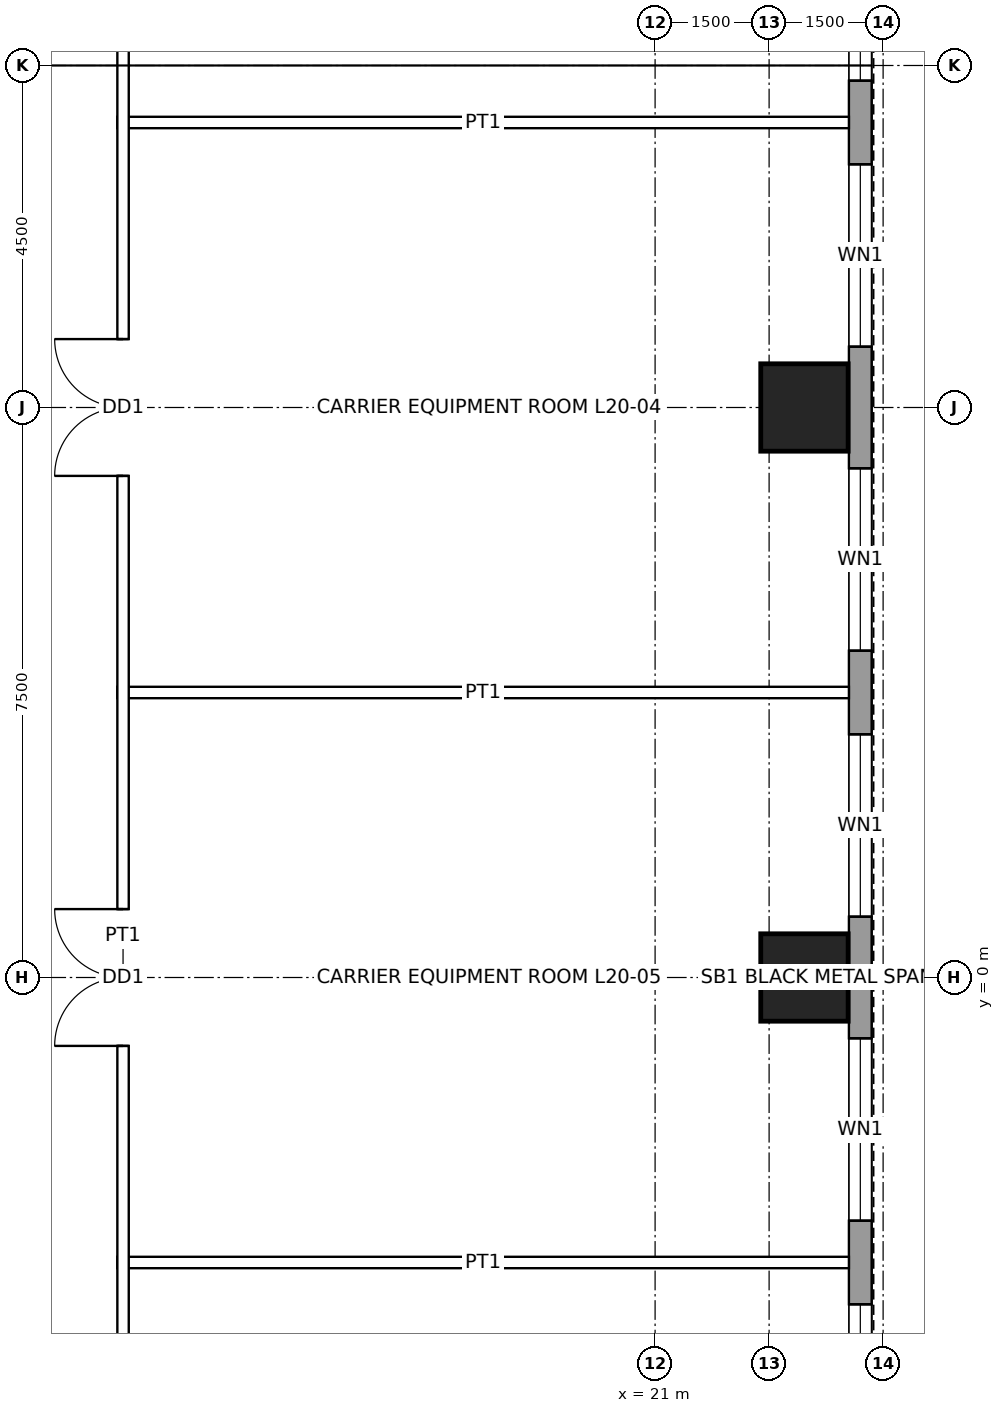
"""IFC4 building model, lengths in metres.
Left out: names, types, materials, properties, quantities, classifications, styles, units other than length and angle.
Written with IfcOpenShell. Run it as: python <this file> out.ifc"""

import sys

from ifc_helpers import new_model, si_unit, direction, frame, frame_2d, origin, origin_2d, place, context, subcontext, project, spatial, rectangle, hollow_rectangle, extrude, element, fill, save


model = new_model("IFC4")
c1 = context("Model", 3, precision=1e-05, world=origin(), true_north=direction((0.0, 1.0)))
c2 = subcontext(c1, "Body", "Model", "MODEL_VIEW")
j1 = project(units=[si_unit("LENGTHUNIT", "METRE"), si_unit("PLANEANGLEUNIT", "RADIAN")], contexts=[c1])
p1 = place(None, origin())
s1 = spatial("IfcSite", under=j1, at=p1, CompositionType="ELEMENT")
p2 = place(p1, origin())
s2 = spatial("IfcBuilding", under=s1, at=p2, CompositionType="ELEMENT")
p3 = place(p2, frame((0.0, 0.0, 104.4)))
s3 = spatial("IfcBuildingStorey", under=s2, at=p3, CompositionType="ELEMENT", Elevation=104.4)
for number, where, z_axis, x_axis in (
    (1, (22.965, 7.5, 0.0), (0.0, 0.0, 1.0), (1.0, 0.0, 0.0)),
    (2, (22.965, 0.0, 0.0), (0.0, 0.0, 1.0), (1.0, 0.0, 0.0)),
):
    element("IfcColumn", number, at=place(p3, frame(where, z_axis=z_axis, x_axis=x_axis)), inside=s3, PredefinedType="COLUMN", context=c2, shape_type="SweptSolid", body=[
        extrude(hollow_rectangle(XDim=1.15, YDim=1.15, WallThickness=0.075, at=origin_2d()), origin(), (0.0, 0.0, 1.0), 4.5),
    ])
p4 = place(p3, frame((23.7, 16.2, 0.0), z_axis=(0.0, 0.0, 1.0), x_axis=(0.0, -1.0, 0.0)))
e3 = element("IfcWall", 3, at=p4, inside=s3, PredefinedType="SOLIDWALL", context=c2, shape_type="SweptSolid", body=[
    extrude(rectangle(XDim=32.4, YDim=0.3, at=frame_2d((16.2, 0.0))), origin(), (0.0, 0.0, 1.0), 4.3),
])
p5 = place(p4, frame((2.0, 0.0, 1.0)))
e4 = element("IfcOpeningElement", 4, at=p5, cuts=e3, PredefinedType="OPENING", context=c2, shape_type="SweptSolid", body=[
    extrude(rectangle(XDim=2.4, YDim=1.2, at=frame_2d((1.2, 0.6))), frame((0.0, 0.16, 0.0), z_axis=(0.0, -1.0, 0.0), x_axis=(1.0, 0.0, 0.0)), (0.0, 0.0, 1.0), 0.32),
])
p6 = place(p4, frame((5.5, 0.0, 1.0)))
e5 = element("IfcOpeningElement", 5, at=p6, cuts=e3, PredefinedType="OPENING", context=c2, shape_type="SweptSolid", body=[
    extrude(rectangle(XDim=2.4, YDim=1.2, at=frame_2d((1.2, 0.6))), frame((0.0, 0.16, 0.0), z_axis=(0.0, -1.0, 0.0), x_axis=(1.0, 0.0, 0.0)), (0.0, 0.0, 1.0), 0.32),
])
p7 = place(p4, frame((9.5, 0.0, 1.0)))
e6 = element("IfcOpeningElement", 6, at=p7, cuts=e3, PredefinedType="OPENING", context=c2, shape_type="SweptSolid", body=[
    extrude(rectangle(XDim=2.4, YDim=1.2, at=frame_2d((1.2, 0.6))), frame((0.0, 0.16, 0.0), z_axis=(0.0, -1.0, 0.0), x_axis=(1.0, 0.0, 0.0)), (0.0, 0.0, 1.0), 0.32),
])
p8 = place(p4, frame((13.0, 0.0, 1.0)))
e7 = element("IfcOpeningElement", 7, at=p8, cuts=e3, PredefinedType="OPENING", context=c2, shape_type="SweptSolid", body=[
    extrude(rectangle(XDim=2.4, YDim=1.2, at=frame_2d((1.2, 0.6))), frame((0.0, 0.16, 0.0), z_axis=(0.0, -1.0, 0.0), x_axis=(1.0, 0.0, 0.0)), (0.0, 0.0, 1.0), 0.32),
])
p9 = place(p4, frame((17.0, 0.0, 1.0)))
e8 = element("IfcOpeningElement", 8, at=p9, cuts=e3, PredefinedType="OPENING", context=c2, shape_type="SweptSolid", body=[
    extrude(rectangle(XDim=2.4, YDim=1.2, at=frame_2d((1.2, 0.6))), frame((0.0, 0.16, 0.0), z_axis=(0.0, -1.0, 0.0), x_axis=(1.0, 0.0, 0.0)), (0.0, 0.0, 1.0), 0.32),
])
p10 = place(p4, frame((20.5, 0.0, 1.0)))
e9 = element("IfcOpeningElement", 9, at=p10, cuts=e3, PredefinedType="OPENING", context=c2, shape_type="SweptSolid", body=[
    extrude(rectangle(XDim=2.4, YDim=1.2, at=frame_2d((1.2, 0.6))), frame((0.0, 0.16, 0.0), z_axis=(0.0, -1.0, 0.0), x_axis=(1.0, 0.0, 0.0)), (0.0, 0.0, 1.0), 0.32),
])
p11 = place(p4, frame((24.5, 0.0, 1.0)))
e10 = element("IfcOpeningElement", 10, at=p11, cuts=e3, PredefinedType="OPENING", context=c2, shape_type="SweptSolid", body=[
    extrude(rectangle(XDim=2.4, YDim=1.2, at=frame_2d((1.2, 0.6))), frame((0.0, 0.16, 0.0), z_axis=(0.0, -1.0, 0.0), x_axis=(1.0, 0.0, 0.0)), (0.0, 0.0, 1.0), 0.32),
])
p12 = place(p4, frame((28.0, 0.0, 1.0)))
e11 = element("IfcOpeningElement", 11, at=p12, cuts=e3, PredefinedType="OPENING", context=c2, shape_type="SweptSolid", body=[
    extrude(rectangle(XDim=2.4, YDim=1.2, at=frame_2d((1.2, 0.6))), frame((0.0, 0.16, 0.0), z_axis=(0.0, -1.0, 0.0), x_axis=(1.0, 0.0, 0.0)), (0.0, 0.0, 1.0), 0.32),
])
for number, where, z_axis, x_axis in (
    (12, (13.925, -3.75, 0.0), (0.0, 0.0, 1.0), (1.0, 0.0, 0.0)),
    (13, (13.925, 3.75, 0.0), (0.0, 0.0, 1.0), (1.0, 0.0, 0.0)),
    (14, (13.925, 11.25, 0.0), (0.0, 0.0, 1.0), (1.0, 0.0, 0.0)),
):
    element("IfcWall", number, at=place(p3, frame(where, z_axis=z_axis, x_axis=x_axis)), inside=s3, PredefinedType="PARTITIONING", context=c2, shape_type="SweptSolid", body=[
        extrude(rectangle(XDim=9.625, YDim=0.15, at=frame_2d((4.812, 0.0))), origin(), (0.0, 0.0, 1.0), 3.431),
    ])
p13 = place(p3, frame((14.0, -14.075, 0.0), z_axis=(0.0, 0.0, 1.0), x_axis=(0.0, 1.0, 0.0)))
e15 = element("IfcWall", 15, at=p13, inside=s3, PredefinedType="PARTITIONING", context=c2, shape_type="SweptSolid", body=[
    extrude(rectangle(XDim=28.15, YDim=0.15, at=frame_2d((14.075, 0.0))), origin(), (0.0, 0.0, 1.0), 4.3),
])
p14 = place(p13, frame((20.675, 0.0, 0.0)))
e16 = element("IfcOpeningElement", 16, at=p14, cuts=e15, PredefinedType="OPENING", context=c2, shape_type="SweptSolid", body=[
    extrude(rectangle(XDim=1.8, YDim=2.4, at=frame_2d((0.9, 1.2))), frame((0.0, 0.085, 0.0), z_axis=(0.0, -1.0, 0.0), x_axis=(1.0, 0.0, 0.0)), (0.0, 0.0, 1.0), 0.17),
])
p15 = place(p13, frame((13.175, 0.0, 0.0)))
e17 = element("IfcOpeningElement", 17, at=p15, cuts=e15, PredefinedType="OPENING", context=c2, shape_type="SweptSolid", body=[
    extrude(rectangle(XDim=1.8, YDim=2.4, at=frame_2d((0.9, 1.2))), frame((0.0, 0.085, 0.0), z_axis=(0.0, -1.0, 0.0), x_axis=(1.0, 0.0, 0.0)), (0.0, 0.0, 1.0), 0.17),
])
p16 = place(p13, frame((5.675, 0.0, 0.0)))
e18 = element("IfcOpeningElement", 18, at=p16, cuts=e15, PredefinedType="OPENING", context=c2, shape_type="SweptSolid", body=[
    extrude(rectangle(XDim=1.8, YDim=2.4, at=frame_2d((0.9, 1.2))), frame((0.0, 0.085, 0.0), z_axis=(0.0, -1.0, 0.0), x_axis=(1.0, 0.0, 0.0)), (0.0, 0.0, 1.0), 0.17),
])
p17 = place(p5, origin())
e19 = element("IfcWindow", 19, at=p17, inside=s3, PartitioningType="SINGLE_PANEL", PredefinedType="WINDOW", context=c2, shape_type="SweptSolid", body=[
    extrude(rectangle(XDim=2.4, YDim=1.2, at=frame_2d((1.2, 0.6))), frame((0.0, 0.03, 0.0), z_axis=(0.0, -1.0, 0.0), x_axis=(1.0, 0.0, 0.0)), (0.0, 0.0, 1.0), 0.06),
])
fill(e4, e19)
p18 = place(p6, origin())
e20 = element("IfcWindow", 20, at=p18, inside=s3, PartitioningType="SINGLE_PANEL", PredefinedType="WINDOW", context=c2, shape_type="SweptSolid", body=[
    extrude(rectangle(XDim=2.4, YDim=1.2, at=frame_2d((1.2, 0.6))), frame((0.0, 0.03, 0.0), z_axis=(0.0, -1.0, 0.0), x_axis=(1.0, 0.0, 0.0)), (0.0, 0.0, 1.0), 0.06),
])
fill(e5, e20)
p19 = place(p7, origin())
e21 = element("IfcWindow", 21, at=p19, inside=s3, PartitioningType="SINGLE_PANEL", PredefinedType="WINDOW", context=c2, shape_type="SweptSolid", body=[
    extrude(rectangle(XDim=2.4, YDim=1.2, at=frame_2d((1.2, 0.6))), frame((0.0, 0.03, 0.0), z_axis=(0.0, -1.0, 0.0), x_axis=(1.0, 0.0, 0.0)), (0.0, 0.0, 1.0), 0.06),
])
fill(e6, e21)
p20 = place(p8, origin())
e22 = element("IfcWindow", 22, at=p20, inside=s3, PartitioningType="SINGLE_PANEL", PredefinedType="WINDOW", context=c2, shape_type="SweptSolid", body=[
    extrude(rectangle(XDim=2.4, YDim=1.2, at=frame_2d((1.2, 0.6))), frame((0.0, 0.03, 0.0), z_axis=(0.0, -1.0, 0.0), x_axis=(1.0, 0.0, 0.0)), (0.0, 0.0, 1.0), 0.06),
])
fill(e7, e22)
p21 = place(p9, origin())
e23 = element("IfcWindow", 23, at=p21, inside=s3, PartitioningType="SINGLE_PANEL", PredefinedType="WINDOW", context=c2, shape_type="SweptSolid", body=[
    extrude(rectangle(XDim=2.4, YDim=1.2, at=frame_2d((1.2, 0.6))), frame((0.0, 0.03, 0.0), z_axis=(0.0, -1.0, 0.0), x_axis=(1.0, 0.0, 0.0)), (0.0, 0.0, 1.0), 0.06),
])
fill(e8, e23)
p22 = place(p10, origin())
e24 = element("IfcWindow", 24, at=p22, inside=s3, PartitioningType="SINGLE_PANEL", PredefinedType="WINDOW", context=c2, shape_type="SweptSolid", body=[
    extrude(rectangle(XDim=2.4, YDim=1.2, at=frame_2d((1.2, 0.6))), frame((0.0, 0.03, 0.0), z_axis=(0.0, -1.0, 0.0), x_axis=(1.0, 0.0, 0.0)), (0.0, 0.0, 1.0), 0.06),
])
fill(e9, e24)
p23 = place(p14, origin())
e25 = element("IfcDoor", 25, at=p23, inside=s3, OperationType="DOUBLE_DOOR_SINGLE_SWING", PredefinedType="DOOR", context=c2, shape_type="SweptSolid", body=[
    extrude(rectangle(XDim=1.8, YDim=2.4, at=frame_2d((0.9, 1.2))), frame((0.0, 0.025, 0.0), z_axis=(0.0, -1.0, 0.0), x_axis=(1.0, 0.0, 0.0)), (0.0, 0.0, 1.0), 0.05),
])
fill(e16, e25)
p24 = place(p15, origin())
e26 = element("IfcDoor", 26, at=p24, inside=s3, OperationType="DOUBLE_DOOR_SINGLE_SWING", PredefinedType="DOOR", context=c2, shape_type="SweptSolid", body=[
    extrude(rectangle(XDim=1.8, YDim=2.4, at=frame_2d((0.9, 1.2))), frame((0.0, 0.025, 0.0), z_axis=(0.0, -1.0, 0.0), x_axis=(1.0, 0.0, 0.0)), (0.0, 0.0, 1.0), 0.05),
])
fill(e17, e26)
save(model, sys.argv[1])
